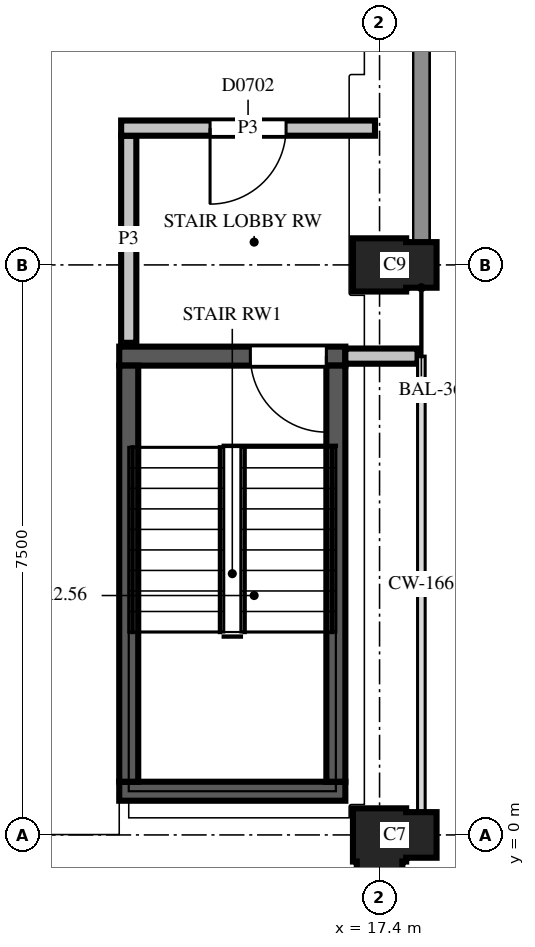
"""IFC4 building model, lengths in metres.
Left out: names, types, materials, properties, quantities, classifications, styles, units other than length and angle.
Written with IfcOpenShell. Run it as: python <this file> out.ifc"""

import sys

from ifc_helpers import new_model, si_unit, direction, frame, frame_2d, origin, place, context, subcontext, project, spatial, polyline, rectangle, outline, extrude, element, fill, save


model = new_model("IFC4")
c1 = context("Model", 3, precision=1e-05, world=origin(), true_north=direction((0.0, 1.0)))
c2 = subcontext(c1, "Body", "Model", "MODEL_VIEW")
j1 = project(units=[si_unit("LENGTHUNIT", "METRE"), si_unit("PLANEANGLEUNIT", "RADIAN")], contexts=[c1])
p1 = place(None, origin())
s1 = spatial("IfcSite", under=j1, at=p1, CompositionType="ELEMENT")
p2 = place(p1, origin())
s2 = spatial("IfcBuilding", under=s1, at=p2, CompositionType="ELEMENT")
p3 = place(p2, frame((0.0, 0.0, 26.7)))
s3 = spatial("IfcBuildingStorey", under=s2, at=p3, CompositionType="ELEMENT", Elevation=26.7)
p4 = place(p3, frame((17.4, 0.0, 0.0), z_axis=(0.0, 0.0, 1.0), x_axis=(0.0, -1.0, 0.0)))
e1 = element("IfcColumn", 1, at=p4, inside=s3, PredefinedType="COLUMN", context=c2, shape_type="SweptSolid", body=[
    extrude(outline(polyline([(-0.35, -0.35), (0.35, -0.35), (0.35, -0.3), (0.75, -0.3), (0.75, 0.3), (0.35, 0.3), (0.35, 0.35), (0.3, 0.35), (0.3, 0.75), (-0.3, 0.75), (-0.3, 0.35), (-0.35, 0.35), (-0.35, -0.35)])), origin(), (0.0, 0.0, 1.0), 3.7),
])
p5 = place(p3, frame((17.4, 7.5, 0.0), z_axis=(0.0, 0.0, 1.0), x_axis=(1.0, 0.0, 0.0)))
e2 = element("IfcColumn", 2, at=p5, inside=s3, PredefinedType="COLUMN", context=c2, shape_type="SweptSolid", body=[
    extrude(outline(polyline([(-0.35, -0.35), (0.35, -0.35), (0.35, -0.3), (0.75, -0.3), (0.75, 0.3), (0.35, 0.3), (0.35, 0.35), (-0.35, 0.35), (-0.35, -0.35)])), origin(), (0.0, 0.0, 1.0), 3.7),
])
p6 = place(p3, frame((13.975, 0.575, 0.0), z_axis=(0.0, 0.0, 1.0), x_axis=(1.0, 0.0, 0.0)))
e3 = element("IfcWall", 3, at=p6, inside=s3, PredefinedType="SHEAR", context=c2, shape_type="SweptSolid", body=[
    extrude(rectangle(XDim=2.975, YDim=0.25, at=frame_2d((1.487, 0.0))), origin(), (0.0, 0.0, 1.0), 3.7),
])
p7 = place(p3, frame((13.975, 6.3, 0.0), z_axis=(0.0, 0.0, 1.0), x_axis=(1.0, 0.0, 0.0)))
e4 = element("IfcWall", 4, at=p7, inside=s3, PredefinedType="SHEAR", context=c2, shape_type="SweptSolid", body=[
    extrude(rectangle(XDim=2.975, YDim=0.25, at=frame_2d((1.487, 0.0))), origin(), (0.0, 0.0, 1.0), 3.7),
])
p8 = place(p7, frame((1.725, 0.0, 0.0)))
e5 = element("IfcOpeningElement", 5, at=p8, cuts=e4, PredefinedType="OPENING", context=c2, shape_type="SweptSolid", body=[
    extrude(rectangle(XDim=1.0, YDim=2.1, at=frame_2d((0.5, 1.05))), frame((0.0, 0.135, 0.0), z_axis=(0.0, -1.0, 0.0), x_axis=(1.0, 0.0, 0.0)), (0.0, 0.0, 1.0), 0.27),
])
for number, where, z_axis, x_axis in (
    (6, (14.1, 0.7, 0.0), (0.0, 0.0, 1.0), (0.0, 1.0, 0.0)),
    (7, (16.825, 0.7, 0.0), (0.0, 0.0, 1.0), (0.0, 1.0, 0.0)),
):
    element("IfcWall", number, at=place(p3, frame(where, z_axis=z_axis, x_axis=x_axis)), inside=s3, PredefinedType="SHEAR", context=c2, shape_type="SweptSolid", body=[
        extrude(rectangle(XDim=5.475, YDim=0.25, at=frame_2d((2.738, 0.0))), origin(), (0.0, 0.0, 1.0), 3.7),
    ])
p9 = place(p3, frame((16.95, 6.3, 0.0), z_axis=(0.0, 0.0, 1.0), x_axis=(1.0, 0.0, 0.0)))
e8 = element("IfcWall", 8, at=p9, inside=s3, PredefinedType="PARTITIONING", context=c2, shape_type="SweptSolid", body=[
    extrude(rectangle(XDim=0.95, YDim=0.2, at=frame_2d((0.475, 0.0))), origin(), (0.0, 0.0, 1.0), 2.88),
])
p10 = place(p3, frame((14.1, 9.2, 0.0), z_axis=(0.0, 0.0, 1.0), x_axis=(0.0, -1.0, 0.0)))
e9 = element("IfcWall", 9, at=p10, inside=s3, PredefinedType="PARTITIONING", context=c2, shape_type="SweptSolid", body=[
    extrude(rectangle(XDim=2.725, YDim=0.2, at=frame_2d((1.362, 0.0))), origin(), (0.0, 0.0, 1.0), 2.88),
])
p11 = place(p3, frame((17.34, 9.3, 0.0), z_axis=(0.0, 0.0, 1.0), x_axis=(-1.0, 0.0, 0.0)))
e10 = element("IfcWall", 10, at=p11, inside=s3, PredefinedType="PARTITIONING", context=c2, shape_type="SweptSolid", body=[
    extrude(rectangle(XDim=3.34, YDim=0.2, at=frame_2d((1.67, 0.0))), origin(), (0.0, 0.0, 1.0), 2.88),
])
p12 = place(p11, frame((1.17, 0.0, 0.0)))
e11 = element("IfcOpeningElement", 11, at=p12, cuts=e10, PredefinedType="OPENING", context=c2, shape_type="SweptSolid", body=[
    extrude(rectangle(XDim=1.0, YDim=2.1, at=frame_2d((0.5, 1.05))), frame((0.0, 0.11, 0.0), z_axis=(0.0, -1.0, 0.0), x_axis=(1.0, 0.0, 0.0)), (0.0, 0.0, 1.0), 0.22),
])
p13 = place(p12, origin())
e12 = element("IfcDoor", 12, at=p13, inside=s3, OperationType="SINGLE_SWING_LEFT", PredefinedType="DOOR", context=c2, shape_type="SweptSolid", body=[
    extrude(rectangle(XDim=1.0, YDim=2.1, at=frame_2d((0.5, 1.05))), frame((0.0, 0.025, 0.0), z_axis=(0.0, -1.0, 0.0), x_axis=(1.0, 0.0, 0.0)), (0.0, 0.0, 1.0), 0.05),
])
fill(e11, e12)
p14 = place(p8, origin())
e13 = element("IfcDoor", 13, at=p14, inside=s3, OperationType="SINGLE_SWING_RIGHT", PredefinedType="DOOR", context=c2, shape_type="SweptSolid", body=[
    extrude(rectangle(XDim=1.0, YDim=2.1, at=frame_2d((0.5, 1.05))), frame((0.0, 0.025, 0.0), z_axis=(0.0, -1.0, 0.0), x_axis=(1.0, 0.0, 0.0)), (0.0, 0.0, 1.0), 0.05),
])
fill(e5, e13)
save(model, sys.argv[1])
